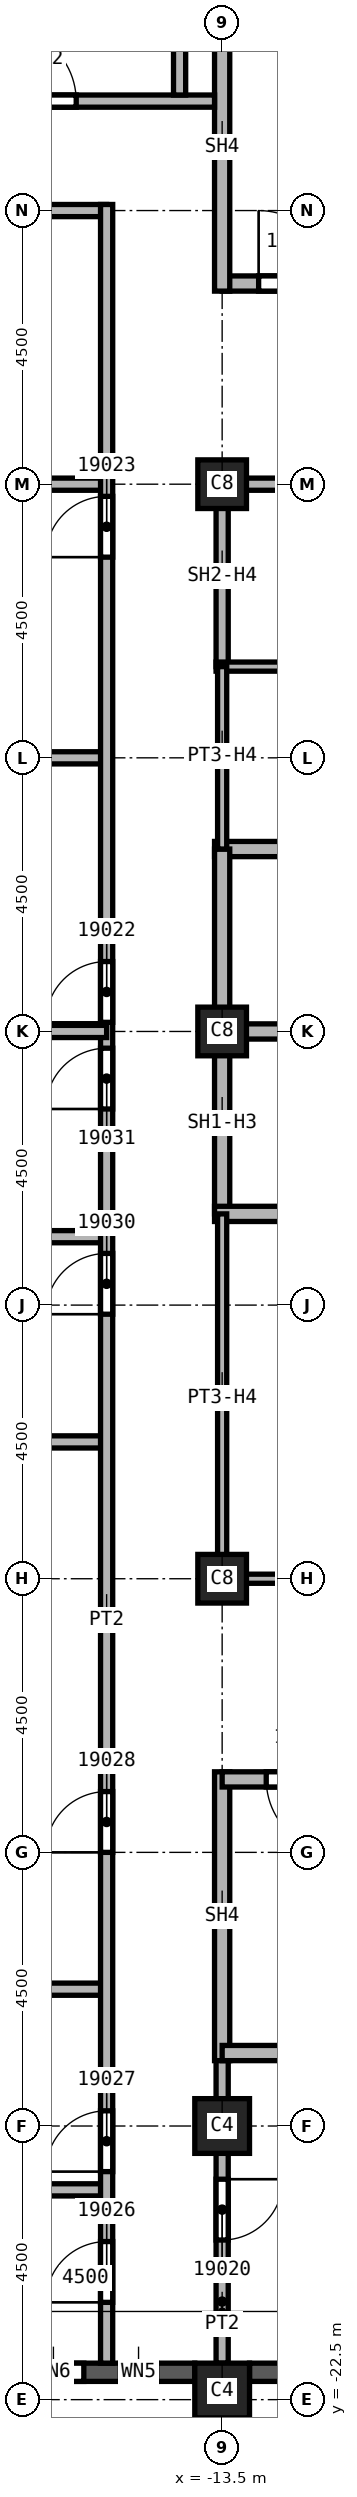
"""IFC4 building model, lengths in metres.
Left out: names, types, materials, properties, quantities, classifications, styles, units other than length and angle.
Written with IfcOpenShell. Run it as: python <this file> out.ifc"""

import sys

from ifc_helpers import new_model, si_unit, direction, frame, frame_2d, origin, origin_2d, place, context, subcontext, project, spatial, rectangle, extrude, element, fill, save


model = new_model("IFC4")
c1 = context("Model", 3, precision=1e-05, world=origin(), true_north=direction((0.0, 1.0)))
c2 = subcontext(c1, "Body", "Model", "MODEL_VIEW")
j1 = project(units=[si_unit("LENGTHUNIT", "METRE"), si_unit("PLANEANGLEUNIT", "RADIAN")], contexts=[c1])
p1 = place(None, origin())
s1 = spatial("IfcSite", under=j1, at=p1, CompositionType="ELEMENT")
p2 = place(p1, origin())
s2 = spatial("IfcBuilding", under=s1, at=p2, CompositionType="ELEMENT")
p3 = place(p2, frame((0.0, 0.0, 282.0)))
s3 = spatial("IfcBuildingStorey", under=s2, at=p3, CompositionType="ELEMENT", Elevation=282.0)
p4 = place(p3, frame((-13.5, -18.0, 0.0), z_axis=(0.0, 0.0, 1.0), x_axis=(1.0, 0.0, 0.0)))
e1 = element("IfcColumn", 1, at=p4, inside=s3, PredefinedType="COLUMN", context=c2, shape_type="SweptSolid", body=[
    extrude(rectangle(XDim=0.9, YDim=0.9, at=origin_2d()), origin(), (0.0, 0.0, 1.0), 3.72),
])
for number, where, z_axis, x_axis in (
    (2, (-13.5, 0.0, 0.0), (0.0, 0.0, 1.0), (1.0, 0.0, 0.0)),
    (3, (-13.5, 9.0, 0.0), (0.0, 0.0, 1.0), (1.0, 0.0, 0.0)),
    (4, (-13.5, -9.0, 0.0), (0.0, 0.0, 1.0), (1.0, 0.0, 0.0)),
):
    element("IfcColumn", number, at=place(p3, frame(where, z_axis=z_axis, x_axis=x_axis)), inside=s3, PredefinedType="COLUMN", context=c2, shape_type="SweptSolid", body=[
        extrude(rectangle(XDim=0.8, YDim=0.8, at=origin_2d()), origin(), (0.0, 0.0, 1.0), 3.72),
    ])
p5 = place(p3, frame((-13.5, -22.35, 0.0), z_axis=(0.0, 0.0, 1.0), x_axis=(1.0, 0.0, 0.0)))
e5 = element("IfcColumn", 5, at=p5, inside=s3, PredefinedType="COLUMN", context=c2, shape_type="SweptSolid", body=[
    extrude(rectangle(XDim=0.9, YDim=0.9, at=origin_2d()), origin(), (0.0, 0.0, 1.0), 3.72),
])
p6 = place(p3, frame((-17.55, -22.05, 0.0), z_axis=(0.0, 0.0, 1.0), x_axis=(1.0, 0.0, 0.0)))
e6 = element("IfcWall", 6, at=p6, inside=s3, PredefinedType="SOLIDWALL", context=c2, shape_type="SweptSolid", body=[
    extrude(rectangle(XDim=3.6, YDim=0.3, at=frame_2d((1.8, 0.0))), origin(), (0.0, 0.0, 1.0), 3.12),
])
p7 = place(p6, frame((0.775, 0.0, 0.8)))
e7 = element("IfcOpeningElement", 7, at=p7, cuts=e6, PredefinedType="OPENING", context=c2, shape_type="SweptSolid", body=[
    extrude(rectangle(XDim=1.0, YDim=1.95, at=frame_2d((0.5, 0.975))), frame((0.0, 0.15, 0.0), z_axis=(0.0, -1.0, 0.0), x_axis=(1.0, 0.0, 0.0)), (0.0, 0.0, 1.0), 0.3),
])
p8 = place(p6, frame((2.375, 0.0, 0.8)))
e8 = element("IfcOpeningElement", 8, at=p8, cuts=e6, PredefinedType="OPENING", context=c2, shape_type="SweptSolid", body=[
    extrude(rectangle(XDim=0.6, YDim=1.95, at=frame_2d((0.3, 0.975))), frame((0.0, 0.15, 0.0), z_axis=(0.0, -1.0, 0.0), x_axis=(1.0, 0.0, 0.0)), (0.0, 0.0, 1.0), 0.3),
])
p9 = place(p3, frame((-13.05, -22.05, 0.0), z_axis=(0.0, 0.0, 1.0), x_axis=(1.0, 0.0, 0.0)))
e9 = element("IfcWall", 9, at=p9, inside=s3, PredefinedType="SOLIDWALL", context=c2, shape_type="SweptSolid", body=[
    extrude(rectangle(XDim=3.6, YDim=0.3, at=frame_2d((1.8, 0.0))), origin(), (0.0, 0.0, 1.0), 3.12),
])
p10 = place(p9, frame((0.6, 0.0, 0.8)))
e10 = element("IfcOpeningElement", 10, at=p10, cuts=e9, PredefinedType="OPENING", context=c2, shape_type="SweptSolid", body=[
    extrude(rectangle(XDim=2.4, YDim=1.95, at=frame_2d((1.2, 0.975))), frame((0.0, 0.15, 0.0), z_axis=(0.0, -1.0, 0.0), x_axis=(1.0, 0.0, 0.0)), (0.0, 0.0, 1.0), 0.3),
])
for number, where, z_axis, x_axis in (
    (11, (-26.55, -15.75, 0.0), (0.0, 0.0, 1.0), (1.0, 0.0, 0.0)),
    (12, (-26.55, -6.75, 0.0), (0.0, 0.0, 1.0), (1.0, 0.0, 0.0)),
    (13, (-26.55, -3.375, 0.0), (0.0, 0.0, 1.0), (1.0, 0.0, 0.0)),
    (14, (-26.55, 4.5, 0.0), (0.0, 0.0, 1.0), (1.0, 0.0, 0.0)),
    (15, (-26.55, 9.0, 0.0), (0.0, 0.0, 1.0), (1.0, 0.0, 0.0)),
):
    element("IfcWall", number, at=place(p3, frame(where, z_axis=z_axis, x_axis=x_axis)), inside=s3, PredefinedType="PARTITIONING", context=c2, shape_type="SweptSolid", body=[
        extrude(rectangle(XDim=11.15, YDim=0.2, at=frame_2d((5.575, 0.0))), origin(), (0.0, 0.0, 1.0), 3.72),
    ])
p11 = place(p3, frame((-24.3, -19.05, 0.0), z_axis=(0.0, 0.0, 1.0), x_axis=(1.0, 0.0, 0.0)))
e16 = element("IfcWall", 16, at=p11, inside=s3, PredefinedType="PARTITIONING", context=c2, shape_type="SweptSolid", body=[
    extrude(rectangle(XDim=8.9, YDim=0.2, at=frame_2d((4.45, 0.0))), origin(), (0.0, 0.0, 1.0), 3.72),
])
p12 = place(p3, frame((-15.4, 13.5, 0.0), z_axis=(0.0, 0.0, 1.0), x_axis=(-1.0, 0.0, 0.0)))
e17 = element("IfcWall", 17, at=p12, inside=s3, PredefinedType="PARTITIONING", context=c2, shape_type="SweptSolid", body=[
    extrude(rectangle(XDim=6.6, YDim=0.2, at=frame_2d((3.3, 0.0))), origin(), (0.0, 0.0, 1.0), 3.72),
])
p13 = place(p12, frame((4.0, 0.0, 0.0)))
e18 = element("IfcOpeningElement", 18, at=p13, cuts=e17, PredefinedType="OPENING", context=c2, shape_type="SweptSolid", body=[
    extrude(rectangle(XDim=1.0, YDim=2.1, at=frame_2d((0.5, 1.05))), frame((0.0, 0.1, 0.0), z_axis=(0.0, -1.0, 0.0), x_axis=(1.0, 0.0, 0.0)), (0.0, 0.0, 1.0), 0.2),
])
p14 = place(p3, frame((-15.4, -21.9, 0.0), z_axis=(0.0, 0.0, 1.0), x_axis=(0.0, 1.0, 0.0)))
e19 = element("IfcWall", 19, at=p14, inside=s3, PredefinedType="PARTITIONING", context=c2, shape_type="SweptSolid", body=[
    extrude(rectangle(XDim=35.5, YDim=0.2, at=frame_2d((17.75, 0.0))), origin(), (0.0, 0.0, 1.0), 3.72),
])
p15 = place(p14, frame((22.05, 0.0, 0.0)))
e20 = element("IfcOpeningElement", 20, at=p15, cuts=e19, PredefinedType="OPENING", context=c2, shape_type="SweptSolid", body=[
    extrude(rectangle(XDim=1.0, YDim=2.1, at=frame_2d((0.5, 1.05))), frame((0.0, 0.1, 0.0), z_axis=(0.0, -1.0, 0.0), x_axis=(1.0, 0.0, 0.0)), (0.0, 0.0, 1.0), 0.2),
])
p16 = place(p14, frame((29.7, 0.0, 0.0)))
e21 = element("IfcOpeningElement", 21, at=p16, cuts=e19, PredefinedType="OPENING", context=c2, shape_type="SweptSolid", body=[
    extrude(rectangle(XDim=1.0, YDim=2.1, at=frame_2d((0.5, 1.05))), frame((0.0, 0.1, 0.0), z_axis=(0.0, -1.0, 0.0), x_axis=(1.0, 0.0, 0.0)), (0.0, 0.0, 1.0), 0.2),
])
p17 = place(p14, frame((1.0, 0.0, 0.0)))
e22 = element("IfcOpeningElement", 22, at=p17, cuts=e19, PredefinedType="OPENING", context=c2, shape_type="SweptSolid", body=[
    extrude(rectangle(XDim=1.0, YDim=2.1, at=frame_2d((0.5, 1.05))), frame((0.0, 0.1, 0.0), z_axis=(0.0, -1.0, 0.0), x_axis=(1.0, 0.0, 0.0)), (0.0, 0.0, 1.0), 0.2),
])
p18 = place(p14, frame((3.15, 0.0, 0.0)))
e23 = element("IfcOpeningElement", 23, at=p18, cuts=e19, PredefinedType="OPENING", context=c2, shape_type="SweptSolid", body=[
    extrude(rectangle(XDim=1.0, YDim=2.1, at=frame_2d((0.5, 1.05))), frame((0.0, 0.1, 0.0), z_axis=(0.0, -1.0, 0.0), x_axis=(1.0, 0.0, 0.0)), (0.0, 0.0, 1.0), 0.2),
])
p19 = place(p14, frame((8.4, 0.0, 0.0)))
e24 = element("IfcOpeningElement", 24, at=p19, cuts=e19, PredefinedType="OPENING", context=c2, shape_type="SweptSolid", body=[
    extrude(rectangle(XDim=1.0, YDim=2.1, at=frame_2d((0.5, 1.05))), frame((0.0, 0.1, 0.0), z_axis=(0.0, -1.0, 0.0), x_axis=(1.0, 0.0, 0.0)), (0.0, 0.0, 1.0), 0.2),
])
p20 = place(p14, frame((17.25, 0.0, 0.0)))
e25 = element("IfcOpeningElement", 25, at=p20, cuts=e19, PredefinedType="OPENING", context=c2, shape_type="SweptSolid", body=[
    extrude(rectangle(XDim=1.0, YDim=2.1, at=frame_2d((0.5, 1.05))), frame((0.0, 0.1, 0.0), z_axis=(0.0, -1.0, 0.0), x_axis=(1.0, 0.0, 0.0)), (0.0, 0.0, 1.0), 0.2),
])
p21 = place(p14, frame((20.625, 0.0, 0.0)))
e26 = element("IfcOpeningElement", 26, at=p21, cuts=e19, PredefinedType="OPENING", context=c2, shape_type="SweptSolid", body=[
    extrude(rectangle(XDim=1.0, YDim=2.1, at=frame_2d((0.5, 1.05))), frame((0.0, 0.1, 0.0), z_axis=(0.0, -1.0, 0.0), x_axis=(1.0, 0.0, 0.0)), (0.0, 0.0, 1.0), 0.2),
])
p22 = place(p3, frame((-15.4, 0.0, 0.0), z_axis=(0.0, 0.0, 1.0), x_axis=(-1.0, 0.0, 0.0)))
e27 = element("IfcWall", 27, at=p22, inside=s3, PredefinedType="PARTITIONING", context=c2, shape_type="SweptSolid", body=[
    extrude(rectangle(XDim=11.15, YDim=0.2, at=frame_2d((5.575, 0.0))), origin(), (0.0, 0.0, 1.0), 3.72),
])
p23 = place(p3, frame((-13.5, -16.675, 0.0), z_axis=(0.0, 0.0, 1.0), x_axis=(0.0, -1.0, 0.0)))
e28 = element("IfcWall", 28, at=p23, inside=s3, PredefinedType="PARTITIONING", context=c2, shape_type="SweptSolid", body=[
    extrude(rectangle(XDim=5.225, YDim=0.2, at=frame_2d((2.612, 0.0))), origin(), (0.0, 0.0, 1.0), 3.72),
])
p24 = place(p23, frame((2.2, 0.0, 0.0)))
e29 = element("IfcOpeningElement", 29, at=p24, cuts=e28, PredefinedType="OPENING", context=c2, shape_type="SweptSolid", body=[
    extrude(rectangle(XDim=1.0, YDim=2.1, at=frame_2d((0.5, 1.05))), frame((0.0, 0.1, 0.0), z_axis=(0.0, -1.0, 0.0), x_axis=(1.0, 0.0, 0.0)), (0.0, 0.0, 1.0), 0.2),
])
p25 = place(p3, frame((-13.5, 6.0, 0.0), z_axis=(0.0, 0.0, 1.0), x_axis=(0.0, 1.0, 0.0)))
e30 = element("IfcWall", 30, at=p25, inside=s3, PredefinedType="SOLIDWALL", context=c2, shape_type="SweptSolid", body=[
    extrude(rectangle(XDim=3.1, YDim=0.2, at=frame_2d((1.55, 0.0))), origin(), (0.0, 0.0, 1.0), 3.042),
])
p26 = place(p3, frame((-13.5, 9.0, 0.0), z_axis=(0.0, 0.0, 1.0), x_axis=(1.0, 0.0, 0.0)))
e31 = element("IfcWall", 31, at=p26, inside=s3, PredefinedType="SOLIDWALL", context=c2, shape_type="SweptSolid", body=[
    extrude(rectangle(XDim=3.0, YDim=0.2, at=frame_2d((1.5, 0.0))), origin(), (0.0, 0.0, 1.0), 3.042),
])
p27 = place(p3, frame((-13.625, 0.0, 0.0), z_axis=(0.0, 0.0, 1.0), x_axis=(1.0, 0.0, 0.0)))
e32 = element("IfcWall", 32, at=p27, inside=s3, PredefinedType="SOLIDWALL", context=c2, shape_type="SweptSolid", body=[
    extrude(rectangle(XDim=3.125, YDim=0.25, at=frame_2d((1.562, 0.0))), origin(), (0.0, 0.0, 1.0), 3.72),
])
p28 = place(p3, frame((-13.625, 3.0, 0.0), z_axis=(0.0, 0.0, 1.0), x_axis=(1.0, 0.0, 0.0)))
e33 = element("IfcWall", 33, at=p28, inside=s3, PredefinedType="SOLIDWALL", context=c2, shape_type="SweptSolid", body=[
    extrude(rectangle(XDim=9.25, YDim=0.25, at=frame_2d((4.625, 0.0))), origin(), (0.0, 0.0, 1.0), 3.72),
])
p29 = place(p28, frame((3.25, 0.0, 0.0)))
e34 = element("IfcOpeningElement", 34, at=p29, cuts=e33, PredefinedType="OPENING", context=c2, shape_type="SweptSolid", body=[
    extrude(rectangle(XDim=1.1, YDim=2.1, at=frame_2d((0.55, 1.05))), frame((0.0, 0.125, 0.0), z_axis=(0.0, -1.0, 0.0), x_axis=(1.0, 0.0, 0.0)), (0.0, 0.0, 1.0), 0.25),
])
p30 = place(p3, frame((-13.5, -3.0, 0.0), z_axis=(0.0, 0.0, 1.0), x_axis=(0.0, 1.0, 0.0)))
e35 = element("IfcWall", 35, at=p30, inside=s3, PredefinedType="SOLIDWALL", context=c2, shape_type="SweptSolid", body=[
    extrude(rectangle(XDim=6.0, YDim=0.25, at=frame_2d((3.0, 0.0))), origin(), (0.0, 0.0, 1.0), 3.042),
])
p31 = place(p3, frame((-13.625, -3.0, 0.0), z_axis=(0.0, 0.0, 1.0), x_axis=(1.0, 0.0, 0.0)))
e36 = element("IfcWall", 36, at=p31, inside=s3, PredefinedType="SOLIDWALL", context=c2, shape_type="SweptSolid", body=[
    extrude(rectangle(XDim=6.125, YDim=0.25, at=frame_2d((3.062, 0.0))), origin(), (0.0, 0.0, 1.0), 3.72),
])
p32 = place(p31, frame((3.25, 0.0, 0.0)))
e37 = element("IfcOpeningElement", 37, at=p32, cuts=e36, PredefinedType="OPENING", context=c2, shape_type="SweptSolid", body=[
    extrude(rectangle(XDim=1.1, YDim=2.1, at=frame_2d((0.55, 1.05))), frame((0.0, 0.125, 0.0), z_axis=(0.0, -1.0, 0.0), x_axis=(1.0, 0.0, 0.0)), (0.0, 0.0, 1.0), 0.25),
])
p33 = place(p3, frame((-13.5, -12.175, 0.0), z_axis=(0.0, 0.0, 1.0), x_axis=(0.0, -1.0, 0.0)))
e38 = element("IfcWall", 38, at=p33, inside=s3, PredefinedType="SOLIDWALL", context=c2, shape_type="SweptSolid", body=[
    extrude(rectangle(XDim=4.75, YDim=0.25, at=frame_2d((2.375, 0.0))), origin(), (0.0, 0.0, 1.0), 3.72),
])
p34 = place(p3, frame((-13.5, 12.3, 0.0), z_axis=(0.0, 0.0, 1.0), x_axis=(1.0, 0.0, 0.0)))
e39 = element("IfcWall", 39, at=p34, inside=s3, PredefinedType="SOLIDWALL", context=c2, shape_type="SweptSolid", body=[
    extrude(rectangle(XDim=9.125, YDim=0.25, at=frame_2d((4.562, 0.0))), origin(), (0.0, 0.0, 1.0), 3.72),
])
p35 = place(p34, frame((0.6, 0.0, 0.0)))
e40 = element("IfcOpeningElement", 40, at=p35, cuts=e39, PredefinedType="OPENING", context=c2, shape_type="SweptSolid", body=[
    extrude(rectangle(XDim=1.2, YDim=2.1, at=frame_2d((0.6, 1.05))), frame((0.0, 0.125, 0.0), z_axis=(0.0, -1.0, 0.0), x_axis=(1.0, 0.0, 0.0)), (0.0, 0.0, 1.0), 0.25),
])
p36 = place(p3, frame((-13.5, 16.78, 0.0), z_axis=(0.0, 0.0, 1.0), x_axis=(0.0, -1.0, 0.0)))
e41 = element("IfcWall", 41, at=p36, inside=s3, PredefinedType="SOLIDWALL", context=c2, shape_type="SweptSolid", body=[
    extrude(rectangle(XDim=4.605, YDim=0.25, at=frame_2d((2.302, 0.0))), origin(), (0.0, 0.0, 1.0), 3.72),
])
p37 = place(p3, frame((-4.5, -16.8, 0.0), z_axis=(0.0, 0.0, 1.0), x_axis=(-1.0, 0.0, 0.0)))
e42 = element("IfcWall", 42, at=p37, inside=s3, PredefinedType="SOLIDWALL", context=c2, shape_type="SweptSolid", body=[
    extrude(rectangle(XDim=9.0, YDim=0.25, at=frame_2d((4.5, 0.0))), origin(), (0.0, 0.0, 1.0), 3.72),
])
p38 = place(p3, frame((-4.375, -12.3, 0.0), z_axis=(0.0, 0.0, 1.0), x_axis=(-1.0, 0.0, 0.0)))
e43 = element("IfcWall", 43, at=p38, inside=s3, PredefinedType="SOLIDWALL", context=c2, shape_type="SweptSolid", body=[
    extrude(rectangle(XDim=9.125, YDim=0.25, at=frame_2d((4.562, 0.0))), origin(), (0.0, 0.0, 1.0), 3.72),
])
p39 = place(p38, frame((7.2, 0.0, 0.0)))
e44 = element("IfcOpeningElement", 44, at=p39, cuts=e43, PredefinedType="OPENING", context=c2, shape_type="SweptSolid", body=[
    extrude(rectangle(XDim=1.2, YDim=2.1, at=frame_2d((0.6, 1.05))), frame((0.0, 0.125, 0.0), z_axis=(0.0, -1.0, 0.0), x_axis=(1.0, 0.0, 0.0)), (0.0, 0.0, 1.0), 0.25),
])
p40 = place(p3, frame((-13.6, 6.0, 0.0), z_axis=(0.0, 0.0, 1.0), x_axis=(1.0, 0.0, 0.0)))
e45 = element("IfcWall", 45, at=p40, inside=s3, PredefinedType="PARTITIONING", context=c2, shape_type="SweptSolid", body=[
    extrude(rectangle(XDim=3.1, YDim=0.15, at=frame_2d((1.55, 0.0))), origin(), (0.0, 0.0, 1.0), 3.72),
])
p41 = place(p3, frame((-13.5, -9.075, 0.0), z_axis=(0.0, 0.0, 1.0), x_axis=(0.0, 1.0, 0.0)))
e46 = element("IfcWall", 46, at=p41, inside=s3, PredefinedType="PARTITIONING", context=c2, shape_type="SweptSolid", body=[
    extrude(rectangle(XDim=6.075, YDim=0.15, at=frame_2d((3.038, 0.0))), origin(), (0.0, 0.0, 1.0), 3.042),
])
for number, where, z_axis, x_axis in (
    (47, (-13.5, 3.0, 0.0), (0.0, 0.0, 1.0), (0.0, 1.0, 0.0)),
    (48, (-10.5, -9.0, 0.0), (0.0, 0.0, 1.0), (-1.0, 0.0, 0.0)),
):
    element("IfcWall", number, at=place(p3, frame(where, z_axis=z_axis, x_axis=x_axis)), inside=s3, PredefinedType="PARTITIONING", context=c2, shape_type="SweptSolid", body=[
        extrude(rectangle(XDim=3.0, YDim=0.15, at=frame_2d((1.5, 0.0))), origin(), (0.0, 0.0, 1.0), 3.042),
    ])
p42 = place(p3, frame((-21.9, 15.3, 0.0), z_axis=(0.0, 0.0, 1.0), x_axis=(1.0, 0.0, 0.0)))
e49 = element("IfcWall", 49, at=p42, inside=s3, PredefinedType="SOLIDWALL", context=c2, shape_type="SweptSolid", body=[
    extrude(rectangle(XDim=8.275, YDim=0.2, at=frame_2d((4.137, 0.0))), origin(), (0.0, 0.0, 1.0), 3.72),
])
p43 = place(p42, frame((4.8, 0.0, 0.0)))
e50 = element("IfcOpeningElement", 50, at=p43, cuts=e49, PredefinedType="OPENING", context=c2, shape_type="SweptSolid", body=[
    extrude(rectangle(XDim=1.2, YDim=2.1, at=frame_2d((0.6, 1.05))), frame((0.0, 0.1, 0.0), z_axis=(0.0, -1.0, 0.0), x_axis=(1.0, 0.0, 0.0)), (0.0, 0.0, 1.0), 0.2),
])
p44 = place(p3, frame((-14.2, 15.4, 0.0), z_axis=(0.0, 0.0, 1.0), x_axis=(0.0, 1.0, 0.0)))
e51 = element("IfcWall", 51, at=p44, inside=s3, PredefinedType="SOLIDWALL", context=c2, shape_type="SweptSolid", body=[
    extrude(rectangle(XDim=5.9, YDim=0.2, at=frame_2d((2.95, 0.0))), origin(), (0.0, 0.0, 1.0), 3.72),
])
p45 = place(p35, origin())
e52 = element("IfcDoor", 52, at=p45, inside=s3, OperationType="SINGLE_SWING_RIGHT", PredefinedType="DOOR", context=c2, shape_type="SweptSolid", body=[
    extrude(rectangle(XDim=1.2, YDim=2.1, at=frame_2d((0.6, 1.05))), frame((0.0, 0.025, 0.0), z_axis=(0.0, -1.0, 0.0), x_axis=(1.0, 0.0, 0.0)), (0.0, 0.0, 1.0), 0.05),
])
fill(e40, e52)
p46 = place(p39, origin())
e53 = element("IfcDoor", 53, at=p46, inside=s3, OperationType="SINGLE_SWING_LEFT", PredefinedType="DOOR", context=c2, shape_type="SweptSolid", body=[
    extrude(rectangle(XDim=1.2, YDim=2.1, at=frame_2d((0.6, 1.05))), frame((0.0, 0.025, 0.0), z_axis=(0.0, -1.0, 0.0), x_axis=(1.0, 0.0, 0.0)), (0.0, 0.0, 1.0), 0.05),
])
fill(e44, e53)
p47 = place(p24, origin())
e54 = element("IfcDoor", 54, at=p47, inside=s3, OperationType="SINGLE_SWING_LEFT", PredefinedType="DOOR", context=c2, shape_type="SweptSolid", body=[
    extrude(rectangle(XDim=1.0, YDim=2.1, at=frame_2d((0.5, 1.05))), frame((0.0, 0.025, 0.0), z_axis=(0.0, -1.0, 0.0), x_axis=(1.0, 0.0, 0.0)), (0.0, 0.0, 1.0), 0.05),
])
fill(e29, e54)
p48 = place(p15, origin())
e55 = element("IfcDoor", 55, at=p48, inside=s3, OperationType="SINGLE_SWING_LEFT", PredefinedType="DOOR", context=c2, shape_type="SweptSolid", body=[
    extrude(rectangle(XDim=1.0, YDim=2.1, at=frame_2d((0.5, 1.05))), frame((0.0, 0.025, 0.0), z_axis=(0.0, -1.0, 0.0), x_axis=(1.0, 0.0, 0.0)), (0.0, 0.0, 1.0), 0.05),
])
fill(e20, e55)
p49 = place(p16, origin())
e56 = element("IfcDoor", 56, at=p49, inside=s3, OperationType="SINGLE_SWING_RIGHT", PredefinedType="DOOR", context=c2, shape_type="SweptSolid", body=[
    extrude(rectangle(XDim=1.0, YDim=2.1, at=frame_2d((0.5, 1.05))), frame((0.0, 0.025, 0.0), z_axis=(0.0, -1.0, 0.0), x_axis=(1.0, 0.0, 0.0)), (0.0, 0.0, 1.0), 0.05),
])
fill(e21, e56)
p50 = place(p17, origin())
e57 = element("IfcDoor", 57, at=p50, inside=s3, OperationType="SINGLE_SWING_LEFT", PredefinedType="DOOR", context=c2, shape_type="SweptSolid", body=[
    extrude(rectangle(XDim=1.0, YDim=2.1, at=frame_2d((0.5, 1.05))), frame((0.0, 0.025, 0.0), z_axis=(0.0, -1.0, 0.0), x_axis=(1.0, 0.0, 0.0)), (0.0, 0.0, 1.0), 0.05),
])
fill(e22, e57)
p51 = place(p18, origin())
e58 = element("IfcDoor", 58, at=p51, inside=s3, OperationType="SINGLE_SWING_RIGHT", PredefinedType="DOOR", context=c2, shape_type="SweptSolid", body=[
    extrude(rectangle(XDim=1.0, YDim=2.1, at=frame_2d((0.5, 1.05))), frame((0.0, 0.025, 0.0), z_axis=(0.0, -1.0, 0.0), x_axis=(1.0, 0.0, 0.0)), (0.0, 0.0, 1.0), 0.05),
])
fill(e23, e58)
p52 = place(p19, origin())
e59 = element("IfcDoor", 59, at=p52, inside=s3, OperationType="SINGLE_SWING_LEFT", PredefinedType="DOOR", context=c2, shape_type="SweptSolid", body=[
    extrude(rectangle(XDim=1.0, YDim=2.1, at=frame_2d((0.5, 1.05))), frame((0.0, 0.025, 0.0), z_axis=(0.0, -1.0, 0.0), x_axis=(1.0, 0.0, 0.0)), (0.0, 0.0, 1.0), 0.05),
])
fill(e24, e59)
p53 = place(p20, origin())
e60 = element("IfcDoor", 60, at=p53, inside=s3, OperationType="SINGLE_SWING_LEFT", PredefinedType="DOOR", context=c2, shape_type="SweptSolid", body=[
    extrude(rectangle(XDim=1.0, YDim=2.1, at=frame_2d((0.5, 1.05))), frame((0.0, 0.025, 0.0), z_axis=(0.0, -1.0, 0.0), x_axis=(1.0, 0.0, 0.0)), (0.0, 0.0, 1.0), 0.05),
])
fill(e25, e60)
p54 = place(p21, origin())
e61 = element("IfcDoor", 61, at=p54, inside=s3, OperationType="SINGLE_SWING_RIGHT", PredefinedType="DOOR", context=c2, shape_type="SweptSolid", body=[
    extrude(rectangle(XDim=1.0, YDim=2.1, at=frame_2d((0.5, 1.05))), frame((0.0, 0.025, 0.0), z_axis=(0.0, -1.0, 0.0), x_axis=(1.0, 0.0, 0.0)), (0.0, 0.0, 1.0), 0.05),
])
fill(e26, e61)
p55 = place(p43, origin())
e62 = element("IfcDoor", 62, at=p55, inside=s3, OperationType="SINGLE_SWING_RIGHT", PredefinedType="DOOR", context=c2, shape_type="SweptSolid", body=[
    extrude(rectangle(XDim=1.2, YDim=2.1, at=frame_2d((0.6, 1.05))), frame((0.0, 0.025, 0.0), z_axis=(0.0, -1.0, 0.0), x_axis=(1.0, 0.0, 0.0)), (0.0, 0.0, 1.0), 0.05),
])
fill(e50, e62)
p56 = place(p7, origin())
e63 = element("IfcWindow", 63, at=p56, inside=s3, PartitioningType="SINGLE_PANEL", PredefinedType="WINDOW", context=c2, shape_type="SweptSolid", body=[
    extrude(rectangle(XDim=1.0, YDim=1.95, at=frame_2d((0.5, 0.975))), frame((0.0, 0.03, 0.0), z_axis=(0.0, -1.0, 0.0), x_axis=(1.0, 0.0, 0.0)), (0.0, 0.0, 1.0), 0.06),
])
fill(e7, e63)
p57 = place(p8, origin())
e64 = element("IfcWindow", 64, at=p57, inside=s3, PartitioningType="SINGLE_PANEL", PredefinedType="WINDOW", context=c2, shape_type="SweptSolid", body=[
    extrude(rectangle(XDim=0.6, YDim=1.95, at=frame_2d((0.3, 0.975))), frame((0.0, 0.03, 0.0), z_axis=(0.0, -1.0, 0.0), x_axis=(1.0, 0.0, 0.0)), (0.0, 0.0, 1.0), 0.06),
])
fill(e8, e64)
save(model, sys.argv[1])
